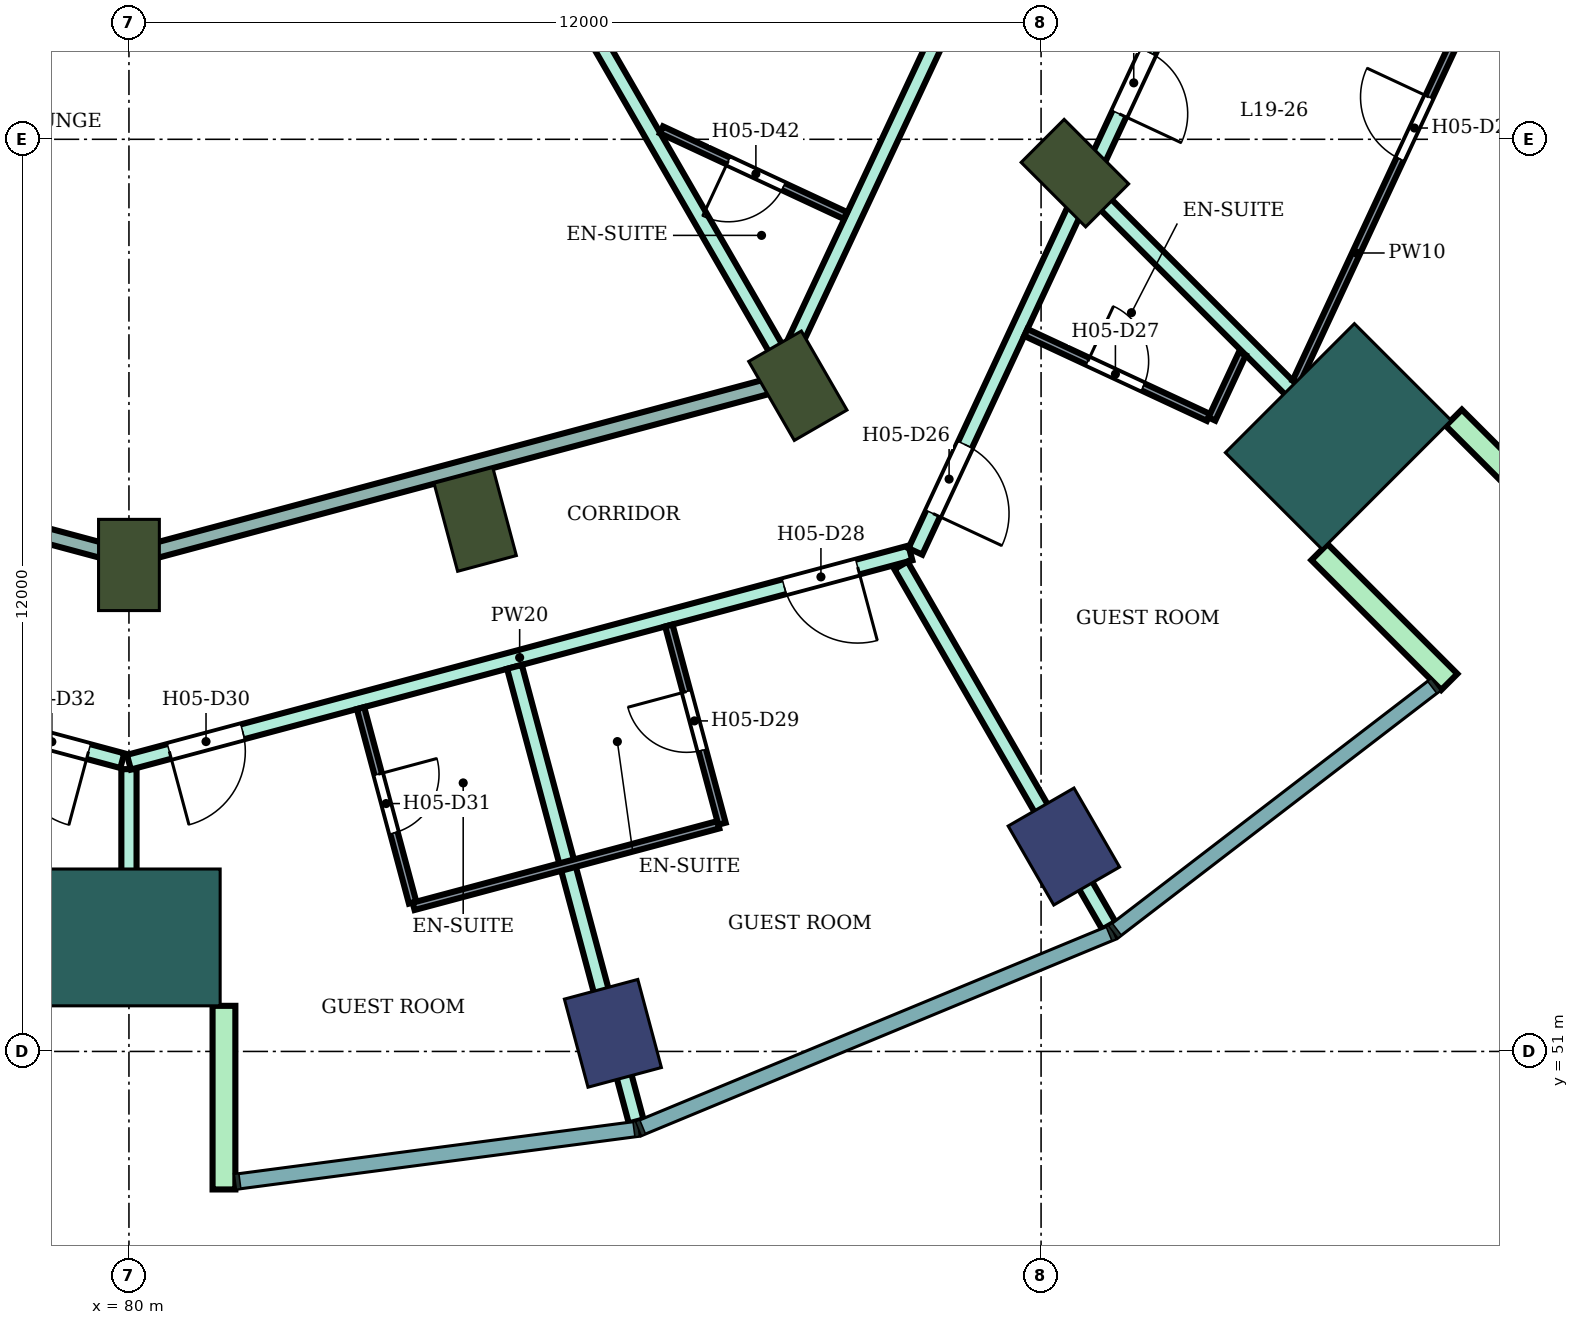
"""IFC4 building model, lengths in metres.
Left out: names, types, materials, properties, quantities, classifications, styles, units other than length and angle.
Written with IfcOpenShell. Run it as: python <this file> out.ifc"""

import sys

from ifc_helpers import new_model, si_unit, direction, frame, frame_2d, origin, origin_2d, place, context, subcontext, project, spatial, rectangle, extrude, element, fill, save


model = new_model("IFC4")
c1 = context("Model", 3, precision=1e-05, world=origin(), true_north=direction((0.0, 1.0)))
c2 = subcontext(c1, "Body", "Model", "MODEL_VIEW")
j1 = project(units=[si_unit("LENGTHUNIT", "METRE"), si_unit("PLANEANGLEUNIT", "RADIAN")], contexts=[c1])
p1 = place(None, origin())
s1 = spatial("IfcSite", under=j1, at=p1, CompositionType="ELEMENT")
p2 = place(p1, origin())
s2 = spatial("IfcBuilding", under=s1, at=p2, CompositionType="ELEMENT")
p3 = place(p2, frame((0.0, 0.0, 86.2)))
s3 = spatial("IfcBuildingStorey", under=s2, at=p3, CompositionType="ELEMENT", Elevation=86.2)
for number, where, z_axis, x_axis in (
    (1, (86.367, 51.238, 0.0), (0.0, 0.0, 1.0), (0.259, -0.966, 0.0)),
    (2, (92.3, 53.696, 0.0), (0.0, 0.0, 1.0), (0.5, -0.866, 0.0)),
):
    element("IfcColumn", number, at=place(p3, frame(where, z_axis=z_axis, x_axis=x_axis)), inside=s3, PredefinedType="COLUMN", context=c2, shape_type="SweptSolid", body=[
        extrude(rectangle(XDim=1.2, YDim=1.0, at=origin_2d()), origin(), (0.0, 0.0, 1.0), 3.8),
    ])
for number, where, z_axis, x_axis in (
    (3, (80.0, 57.4, 0.0), (0.0, 0.0, 1.0), (0.0, -1.0, 0.0)),
    (4, (84.555, 58.0, 0.0), (0.0, 0.0, 1.0), (0.259, -0.966, 0.0)),
    (5, (88.8, 59.758, 0.0), (0.0, 0.0, 1.0), (0.5, -0.866, 0.0)),
    (6, (92.445, 62.555, 0.0), (0.0, 0.0, 1.0), (0.707, -0.707, 0.0)),
):
    element("IfcColumn", number, at=place(p3, frame(where, z_axis=z_axis, x_axis=x_axis)), inside=s3, PredefinedType="COLUMN", context=c2, shape_type="SweptSolid", body=[
        extrude(rectangle(XDim=1.2, YDim=0.8, at=origin_2d()), origin(), (0.0, 0.0, 1.0), 3.8),
    ])
for number, where, z_axis, x_axis in (
    (7, (80.0, 52.5, 0.0), (0.0, 0.0, 1.0), (0.0, -1.0, 0.0)),
    (8, (95.91, 59.09, 0.0), (0.0, 0.0, 1.0), (0.707, -0.707, 0.0)),
):
    element("IfcColumn", number, at=place(p3, frame(where, z_axis=z_axis, x_axis=x_axis)), inside=s3, PredefinedType="COLUMN", context=c2, shape_type="SweptSolid", body=[
        extrude(rectangle(XDim=1.8, YDim=2.4, at=origin_2d()), origin(), (0.0, 0.0, 1.0), 3.8),
    ])
for number, where, z_axis, x_axis in (
    (9, (81.25, 51.6, 0.0), (0.0, 0.0, 1.0), (0.0, -1.0, 0.0)),
    (10, (95.662, 57.57, 0.0), (0.0, 0.0, 1.0), (0.707, -0.707, 0.0)),
    (11, (97.43, 59.338, 0.0), (0.0, 0.0, 1.0), (0.707, -0.707, 0.0)),
):
    element("IfcWall", number, at=place(p3, frame(where, z_axis=z_axis, x_axis=x_axis)), inside=s3, PredefinedType="NOTDEFINED", context=c2, shape_type="SweptSolid", body=[
        extrude(rectangle(XDim=2.416, YDim=0.3, at=frame_2d((1.208, 0.0))), origin(), (0.0, 0.0, 1.0), 3.8),
    ])
p4 = place(p3, frame((69.652, 57.578, 0.0), z_axis=(0.0, 0.0, 1.0), x_axis=(0.965857425723, -0.259074184695, 0.0)))
e12 = element("IfcWall", 12, at=p4, inside=s3, PredefinedType="PARTITIONING", context=c2, shape_type="SweptSolid", body=[
    extrude(rectangle(XDim=10.623, YDim=0.2, at=frame_2d((5.312, 0.0))), origin(), (0.0, 0.0, 1.0), 3.35),
])
p5 = place(p4, frame((9.163, 0.0, 0.0)))
e13 = element("IfcOpeningElement", 13, at=p5, cuts=e12, PredefinedType="OPENING", context=c2, shape_type="SweptSolid", body=[
    extrude(rectangle(XDim=1.0, YDim=2.1, at=frame_2d((0.5, 1.05))), frame((0.0, 0.11, 0.0), z_axis=(0.0, -1.0, 0.0), x_axis=(1.0, 0.0, 0.0)), (0.0, 0.0, 1.0), 0.22),
])
p6 = place(p4, frame((0.788, 0.0, 0.0)))
e14 = element("IfcOpeningElement", 14, at=p6, cuts=e12, PredefinedType="OPENING", context=c2, shape_type="SweptSolid", body=[
    extrude(rectangle(XDim=1.0, YDim=2.1, at=frame_2d((0.5, 1.05))), frame((0.0, 0.11, 0.0), z_axis=(0.0, -1.0, 0.0), x_axis=(1.0, 0.0, 0.0)), (0.0, 0.0, 1.0), 0.22),
])
p7 = place(p3, frame((71.498, 59.774, 0.0), z_axis=(0.0, 0.0, 1.0), x_axis=(0.965911938046, -0.258870871168, 0.0)))
e15 = element("IfcWall", 15, at=p7, inside=s3, PredefinedType="PARTITIONING", context=c2, shape_type="SweptSolid", body=[
    extrude(rectangle(XDim=8.752, YDim=0.2, at=frame_2d((4.376, 0.0))), origin(), (0.0, 0.0, 1.0), 2.98),
])
p8 = place(p7, frame((4.701, 0.0, 0.0)))
e16 = element("IfcOpeningElement", 16, at=p8, cuts=e15, PredefinedType="OPENING", context=c2, shape_type="SweptSolid", body=[
    extrude(rectangle(XDim=1.8, YDim=2.1, at=frame_2d((0.9, 1.05))), frame((0.0, 0.11, 0.0), z_axis=(0.0, -1.0, 0.0), x_axis=(1.0, 0.0, 0.0)), (0.0, 0.0, 1.0), 0.22),
])
p9 = place(p3, frame((80.0, 51.8, 0.0), z_axis=(0.0, 0.0, 1.0), x_axis=(0.0, 1.0, 0.0)))
e17 = element("IfcWall", 17, at=p9, inside=s3, PredefinedType="PARTITIONING", context=c2, shape_type="SweptSolid", body=[
    extrude(rectangle(XDim=2.914, YDim=0.2, at=frame_2d((1.457, 0.0))), origin(), (0.0, 0.0, 1.0), 3.35),
])
p10 = place(p3, frame((80.0, 54.805, 0.0), z_axis=(0.0, 0.0, 1.0), x_axis=(0.965962177934, 0.258683340788, 0.0)))
e18 = element("IfcWall", 18, at=p10, inside=s3, PredefinedType="PARTITIONING", context=c2, shape_type="SweptSolid", body=[
    extrude(rectangle(XDim=10.643, YDim=0.2, at=frame_2d((5.322, 0.0))), origin(), (0.0, 0.0, 1.0), 3.35),
])
p11 = place(p10, frame((8.925, 0.0, 0.0)))
e19 = element("IfcOpeningElement", 19, at=p11, cuts=e18, PredefinedType="OPENING", context=c2, shape_type="SweptSolid", body=[
    extrude(rectangle(XDim=1.0, YDim=2.1, at=frame_2d((0.5, 1.05))), frame((0.0, 0.11, 0.0), z_axis=(0.0, -1.0, 0.0), x_axis=(1.0, 0.0, 0.0)), (0.0, 0.0, 1.0), 0.22),
])
p12 = place(p10, frame((0.55, 0.0, 0.0)))
e20 = element("IfcOpeningElement", 20, at=p12, cuts=e18, PredefinedType="OPENING", context=c2, shape_type="SweptSolid", body=[
    extrude(rectangle(XDim=1.0, YDim=2.1, at=frame_2d((0.5, 1.05))), frame((0.0, 0.11, 0.0), z_axis=(0.0, -1.0, 0.0), x_axis=(1.0, 0.0, 0.0)), (0.0, 0.0, 1.0), 0.22),
])
p13 = place(p3, frame((80.0, 57.496, 0.0), z_axis=(0.0, 0.0, 1.0), x_axis=(0.96592471314, 0.258823199396, 0.0)))
e21 = element("IfcWall", 21, at=p13, inside=s3, PredefinedType="PARTITIONING", context=c2, shape_type="SweptSolid", body=[
    extrude(rectangle(XDim=8.732, YDim=0.2, at=frame_2d((4.366, 0.0))), origin(), (0.0, 0.0, 1.0), 2.98),
])
p14 = place(p3, frame((83.846, 68.33, 0.0), z_axis=(0.0, 0.0, 1.0), x_axis=(0.499822319857, -0.866127963163, 0.0)))
e22 = element("IfcWall", 22, at=p14, inside=s3, PredefinedType="PARTITIONING", context=c2, shape_type="SweptSolid", body=[
    extrude(rectangle(XDim=9.382, YDim=0.2, at=frame_2d((4.691, 0.0))), origin(), (0.0, 0.0, 1.0), 3.35),
])
p15 = place(p3, frame((85.072, 56.06, 0.0), z_axis=(0.0, 0.0, 1.0), x_axis=(0.258703231129, -0.965956851109, 0.0)))
e23 = element("IfcWall", 23, at=p15, inside=s3, PredefinedType="PARTITIONING", context=c2, shape_type="SweptSolid", body=[
    extrude(rectangle(XDim=6.191, YDim=0.2, at=frame_2d((3.095, 0.0))), origin(), (0.0, 0.0, 1.0), 3.35),
])
p16 = place(p3, frame((88.501, 59.775, 0.0), z_axis=(0.0, 0.0, 1.0), x_axis=(0.424700525505, 0.905333896215, 0.0)))
e24 = element("IfcWall", 24, at=p16, inside=s3, PredefinedType="PARTITIONING", context=c2, shape_type="SweptSolid", body=[
    extrude(rectangle(XDim=7.53, YDim=0.2, at=frame_2d((3.765, 0.0))), origin(), (0.0, 0.0, 1.0), 3.35),
])
p17 = place(p16, frame((5.83, 0.0, 0.0)))
e25 = element("IfcOpeningElement", 25, at=p17, cuts=e24, PredefinedType="OPENING", context=c2, shape_type="SweptSolid", body=[
    extrude(rectangle(XDim=1.0, YDim=2.1, at=frame_2d((0.5, 1.05))), frame((0.0, 0.11, 0.0), z_axis=(0.0, -1.0, 0.0), x_axis=(1.0, 0.0, 0.0)), (0.0, 0.0, 1.0), 0.22),
])
p18 = place(p3, frame((90.157, 57.394, 0.0), z_axis=(0.0, 0.0, 1.0), x_axis=(0.499815153866, -0.86613209845, 0.0)))
e26 = element("IfcWall", 26, at=p18, inside=s3, PredefinedType="PARTITIONING", context=c2, shape_type="SweptSolid", body=[
    extrude(rectangle(XDim=5.472, YDim=0.2, at=frame_2d((2.736, 0.0))), origin(), (0.0, 0.0, 1.0), 3.35),
])
p19 = place(p3, frame((90.346, 57.578, 0.0), z_axis=(0.0, 0.0, 1.0), x_axis=(0.422403412327, 0.906407941964, 0.0)))
e27 = element("IfcWall", 27, at=p19, inside=s3, PredefinedType="PARTITIONING", context=c2, shape_type="SweptSolid", body=[
    extrude(rectangle(XDim=8.208, YDim=0.2, at=frame_2d((4.104, 0.0))), origin(), (0.0, 0.0, 1.0), 3.35),
])
p20 = place(p19, frame((6.351, 0.0, 0.0)))
e28 = element("IfcOpeningElement", 28, at=p20, cuts=e27, PredefinedType="OPENING", context=c2, shape_type="SweptSolid", body=[
    extrude(rectangle(XDim=0.9, YDim=2.1, at=frame_2d((0.45, 1.05))), frame((0.0, 0.11, 0.0), z_axis=(0.0, -1.0, 0.0), x_axis=(1.0, 0.0, 0.0)), (0.0, 0.0, 1.0), 0.22),
])
p21 = place(p19, frame((0.55, 0.0, 0.0)))
e29 = element("IfcOpeningElement", 29, at=p21, cuts=e27, PredefinedType="OPENING", context=c2, shape_type="SweptSolid", body=[
    extrude(rectangle(XDim=1.0, YDim=2.1, at=frame_2d((0.5, 1.05))), frame((0.0, 0.11, 0.0), z_axis=(0.0, -1.0, 0.0), x_axis=(1.0, 0.0, 0.0)), (0.0, 0.0, 1.0), 0.22),
])
p22 = place(p3, frame((92.692, 62.303, 0.0), z_axis=(0.0, 0.0, 1.0), x_axis=(0.706920663731, -0.707292849667, 0.0)))
e30 = element("IfcWall", 30, at=p22, inside=s3, PredefinedType="PARTITIONING", context=c2, shape_type="SweptSolid", body=[
    extrude(rectangle(XDim=5.248, YDim=0.2, at=frame_2d((2.624, 0.0))), origin(), (0.0, 0.0, 1.0), 3.35),
])
p23 = place(p3, frame((83.047, 55.516, 0.0), z_axis=(0.0, 0.0, 1.0), x_axis=(0.258677737588, -0.965963678446, 0.0)))
e31 = element("IfcWall", 31, at=p23, inside=s3, PredefinedType="PARTITIONING", context=c2, shape_type="SweptSolid", body=[
    extrude(rectangle(XDim=2.649, YDim=0.1, at=frame_2d((1.325, 0.0))), origin(), (0.0, 0.0, 1.0), 3.35),
])
p24 = place(p23, frame((0.9, 0.0, 0.0)))
e32 = element("IfcOpeningElement", 32, at=p24, cuts=e31, PredefinedType="OPENING", context=c2, shape_type="SweptSolid", body=[
    extrude(rectangle(XDim=0.8, YDim=2.1, at=frame_2d((0.4, 1.05))), frame((0.0, 0.06, 0.0), z_axis=(0.0, -1.0, 0.0), x_axis=(1.0, 0.0, 0.0)), (0.0, 0.0, 1.0), 0.12),
])
p25 = place(p3, frame((83.745, 52.909, 0.0), z_axis=(0.0, 0.0, 1.0), x_axis=(0.965995295758, 0.258559642196, 0.0)))
e33 = element("IfcWall", 33, at=p25, inside=s3, PredefinedType="PARTITIONING", context=c2, shape_type="SweptSolid", body=[
    extrude(rectangle(XDim=4.15, YDim=0.1, at=frame_2d((2.075, 0.0))), origin(), (0.0, 0.0, 1.0), 3.35),
])
p26 = place(p3, frame((87.006, 63.124, 0.0), z_axis=(0.0, 0.0, 1.0), x_axis=(0.906535604863, -0.422129360642, 0.0)))
e34 = element("IfcWall", 34, at=p26, inside=s3, PredefinedType="PARTITIONING", context=c2, shape_type="SweptSolid", body=[
    extrude(rectangle(XDim=2.67, YDim=0.1, at=frame_2d((1.335, 0.0))), origin(), (0.0, 0.0, 1.0), 3.35),
])
p27 = place(p26, frame((0.97, 0.0, 0.0)))
e35 = element("IfcOpeningElement", 35, at=p27, cuts=e34, PredefinedType="OPENING", context=c2, shape_type="SweptSolid", body=[
    extrude(rectangle(XDim=0.8, YDim=2.1, at=frame_2d((0.4, 1.05))), frame((0.0, 0.06, 0.0), z_axis=(0.0, -1.0, 0.0), x_axis=(1.0, 0.0, 0.0)), (0.0, 0.0, 1.0), 0.12),
])
p28 = place(p3, frame((87.103, 56.604, 0.0), z_axis=(0.0, 0.0, 1.0), x_axis=(0.258883730688, -0.965908491517, 0.0)))
e36 = element("IfcWall", 36, at=p28, inside=s3, PredefinedType="PARTITIONING", context=c2, shape_type="SweptSolid", body=[
    extrude(rectangle(XDim=2.7, YDim=0.1, at=frame_2d((1.35, 0.0))), origin(), (0.0, 0.0, 1.0), 3.35),
])
p29 = place(p28, frame((0.9, 0.0, 0.0)))
e37 = element("IfcOpeningElement", 37, at=p29, cuts=e36, PredefinedType="OPENING", context=c2, shape_type="SweptSolid", body=[
    extrude(rectangle(XDim=0.8, YDim=2.1, at=frame_2d((0.4, 1.05))), frame((0.0, 0.06, 0.0), z_axis=(0.0, -1.0, 0.0), x_axis=(1.0, 0.0, 0.0)), (0.0, 0.0, 1.0), 0.12),
])
p30 = place(p3, frame((91.8, 60.459, 0.0), z_axis=(0.0, 0.0, 1.0), x_axis=(0.906644059932, -0.421896371861, 0.0)))
e38 = element("IfcWall", 38, at=p30, inside=s3, PredefinedType="PARTITIONING", context=c2, shape_type="SweptSolid", body=[
    extrude(rectangle(XDim=2.649, YDim=0.1, at=frame_2d((1.325, 0.0))), origin(), (0.0, 0.0, 1.0), 3.35),
])
p31 = place(p30, frame((0.899, 0.0, 0.0)))
e39 = element("IfcOpeningElement", 39, at=p31, cuts=e38, PredefinedType="OPENING", context=c2, shape_type="SweptSolid", body=[
    extrude(rectangle(XDim=0.8, YDim=2.1, at=frame_2d((0.4, 1.05))), frame((0.0, 0.06, 0.0), z_axis=(0.0, -1.0, 0.0), x_axis=(1.0, 0.0, 0.0)), (0.0, 0.0, 1.0), 0.12),
])
p32 = place(p3, frame((94.247, 59.32, 0.0), z_axis=(0.0, 0.0, 1.0), x_axis=(0.422660124657, 0.906288264861, 0.0)))
e40 = element("IfcWall", 40, at=p32, inside=s3, PredefinedType="PARTITIONING", context=c2, shape_type="SweptSolid", body=[
    extrude(rectangle(XDim=0.949, YDim=0.1, at=frame_2d((0.475, 0.0))), origin(), (0.0, 0.0, 1.0), 3.35),
])
p33 = place(p3, frame((95.355, 59.806, 0.0), z_axis=(0.0, 0.0, 1.0), x_axis=(0.422407546544, 0.906406015328, 0.0)))
e41 = element("IfcWall", 41, at=p33, inside=s3, PredefinedType="PARTITIONING", context=c2, shape_type="SweptSolid", body=[
    extrude(rectangle(XDim=7.496, YDim=0.1, at=frame_2d((3.748, 0.0))), origin(), (0.0, 0.0, 1.0), 3.35),
])
p34 = place(p33, frame((3.238, 0.0, 0.0)))
e42 = element("IfcOpeningElement", 42, at=p34, cuts=e41, PredefinedType="OPENING", context=c2, shape_type="SweptSolid", body=[
    extrude(rectangle(XDim=0.9, YDim=2.1, at=frame_2d((0.45, 1.05))), frame((0.0, 0.06, 0.0), z_axis=(0.0, -1.0, 0.0), x_axis=(1.0, 0.0, 0.0)), (0.0, 0.0, 1.0), 0.12),
])
p35 = place(p20, frame((0.9, 0.0, 0.0), z_axis=(0.0, 0.0, 1.0), x_axis=(-1.0, 0.0, 0.0)))
e43 = element("IfcDoor", 43, at=p35, inside=s3, OperationType="SINGLE_SWING_RIGHT", PredefinedType="DOOR", context=c2, shape_type="SweptSolid", body=[
    extrude(rectangle(XDim=0.9, YDim=2.1, at=frame_2d((0.45, 1.05))), frame((0.0, 0.025, 0.0), z_axis=(0.0, -1.0, 0.0), x_axis=(1.0, 0.0, 0.0)), (0.0, 0.0, 1.0), 0.05),
])
fill(e28, e43)
p36 = place(p34, origin())
e44 = element("IfcDoor", 44, at=p36, inside=s3, OperationType="SINGLE_SWING_RIGHT", PredefinedType="DOOR", context=c2, shape_type="SweptSolid", body=[
    extrude(rectangle(XDim=0.9, YDim=2.1, at=frame_2d((0.45, 1.05))), frame((0.0, 0.025, 0.0), z_axis=(0.0, -1.0, 0.0), x_axis=(1.0, 0.0, 0.0)), (0.0, 0.0, 1.0), 0.05),
])
fill(e42, e44)
p37 = place(p21, frame((1.0, 0.0, 0.0), z_axis=(0.0, 0.0, 1.0), x_axis=(-1.0, 0.0, 0.0)))
e45 = element("IfcDoor", 45, at=p37, inside=s3, OperationType="SINGLE_SWING_RIGHT", PredefinedType="DOOR", context=c2, shape_type="SweptSolid", body=[
    extrude(rectangle(XDim=1.0, YDim=2.1, at=frame_2d((0.5, 1.05))), frame((0.0, 0.025, 0.0), z_axis=(0.0, -1.0, 0.0), x_axis=(1.0, 0.0, 0.0)), (0.0, 0.0, 1.0), 0.05),
])
fill(e29, e45)
p38 = place(p31, origin())
e46 = element("IfcDoor", 46, at=p38, inside=s3, OperationType="SINGLE_SWING_LEFT", PredefinedType="DOOR", context=c2, shape_type="SweptSolid", body=[
    extrude(rectangle(XDim=0.8, YDim=2.1, at=frame_2d((0.4, 1.05))), frame((0.0, 0.025, 0.0), z_axis=(0.0, -1.0, 0.0), x_axis=(1.0, 0.0, 0.0)), (0.0, 0.0, 1.0), 0.05),
])
fill(e39, e46)
p39 = place(p11, frame((1.0, 0.0, 0.0), z_axis=(0.0, 0.0, 1.0), x_axis=(-1.0, 0.0, 0.0)))
e47 = element("IfcDoor", 47, at=p39, inside=s3, OperationType="SINGLE_SWING_LEFT", PredefinedType="DOOR", context=c2, shape_type="SweptSolid", body=[
    extrude(rectangle(XDim=1.0, YDim=2.1, at=frame_2d((0.5, 1.05))), frame((0.0, 0.025, 0.0), z_axis=(0.0, -1.0, 0.0), x_axis=(1.0, 0.0, 0.0)), (0.0, 0.0, 1.0), 0.05),
])
fill(e19, e47)
p40 = place(p29, frame((0.8, 0.0, 0.0), z_axis=(0.0, 0.0, 1.0), x_axis=(-1.0, 0.0, 0.0)))
e48 = element("IfcDoor", 48, at=p40, inside=s3, OperationType="SINGLE_SWING_RIGHT", PredefinedType="DOOR", context=c2, shape_type="SweptSolid", body=[
    extrude(rectangle(XDim=0.8, YDim=2.1, at=frame_2d((0.4, 1.05))), frame((0.0, 0.025, 0.0), z_axis=(0.0, -1.0, 0.0), x_axis=(1.0, 0.0, 0.0)), (0.0, 0.0, 1.0), 0.05),
])
fill(e37, e48)
p41 = place(p12, frame((1.0, 0.0, 0.0), z_axis=(0.0, 0.0, 1.0), x_axis=(-1.0, 0.0, 0.0)))
e49 = element("IfcDoor", 49, at=p41, inside=s3, OperationType="SINGLE_SWING_RIGHT", PredefinedType="DOOR", context=c2, shape_type="SweptSolid", body=[
    extrude(rectangle(XDim=1.0, YDim=2.1, at=frame_2d((0.5, 1.05))), frame((0.0, 0.025, 0.0), z_axis=(0.0, -1.0, 0.0), x_axis=(1.0, 0.0, 0.0)), (0.0, 0.0, 1.0), 0.05),
])
fill(e20, e49)
p42 = place(p24, origin())
e50 = element("IfcDoor", 50, at=p42, inside=s3, OperationType="SINGLE_SWING_LEFT", PredefinedType="DOOR", context=c2, shape_type="SweptSolid", body=[
    extrude(rectangle(XDim=0.8, YDim=2.1, at=frame_2d((0.4, 1.05))), frame((0.0, 0.025, 0.0), z_axis=(0.0, -1.0, 0.0), x_axis=(1.0, 0.0, 0.0)), (0.0, 0.0, 1.0), 0.05),
])
fill(e32, e50)
p43 = place(p5, frame((1.0, 0.0, 0.0), z_axis=(0.0, 0.0, 1.0), x_axis=(-1.0, 0.0, 0.0)))
e51 = element("IfcDoor", 51, at=p43, inside=s3, OperationType="SINGLE_SWING_LEFT", PredefinedType="DOOR", context=c2, shape_type="SweptSolid", body=[
    extrude(rectangle(XDim=1.0, YDim=2.1, at=frame_2d((0.5, 1.05))), frame((0.0, 0.025, 0.0), z_axis=(0.0, -1.0, 0.0), x_axis=(1.0, 0.0, 0.0)), (0.0, 0.0, 1.0), 0.05),
])
fill(e13, e51)
p44 = place(p27, frame((0.8, 0.0, 0.0), z_axis=(0.0, 0.0, 1.0), x_axis=(-1.0, 0.0, 0.0)))
e52 = element("IfcDoor", 52, at=p44, inside=s3, OperationType="SINGLE_SWING_RIGHT", PredefinedType="DOOR", context=c2, shape_type="SweptSolid", body=[
    extrude(rectangle(XDim=0.8, YDim=2.1, at=frame_2d((0.4, 1.05))), frame((0.0, 0.025, 0.0), z_axis=(0.0, -1.0, 0.0), x_axis=(1.0, 0.0, 0.0)), (0.0, 0.0, 1.0), 0.05),
])
fill(e35, e52)
save(model, sys.argv[1])
